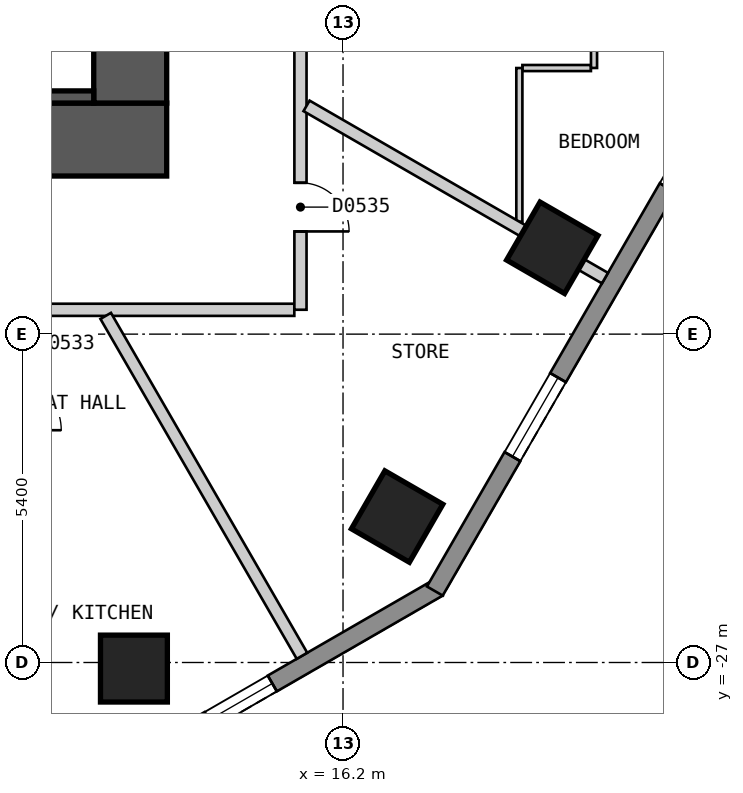
"""IFC4 building model, lengths in metres.
Left out: names, types, materials, properties, quantities, classifications, styles, units other than length and angle.
Written with IfcOpenShell. Run it as: python <this file> out.ifc"""

import sys

from ifc_helpers import new_model, si_unit, direction, frame, frame_2d, origin, origin_2d, place, context, subcontext, project, spatial, polyline, rectangle, outline, extrude, element, fill, save


model = new_model("IFC4")
c1 = context("Model", 3, precision=1e-05, world=origin(), true_north=direction((0.0, 1.0)))
c2 = subcontext(c1, "Body", "Model", "MODEL_VIEW")
j1 = project(units=[si_unit("LENGTHUNIT", "METRE"), si_unit("PLANEANGLEUNIT", "RADIAN")], contexts=[c1])
p1 = place(None, origin())
s1 = spatial("IfcSite", under=j1, at=p1, CompositionType="ELEMENT")
p2 = place(p1, origin())
s2 = spatial("IfcBuilding", under=s1, at=p2, CompositionType="ELEMENT")
p3 = place(p2, frame((0.0, 0.0, 56.4)))
s3 = spatial("IfcBuildingStorey", under=s2, at=p3, CompositionType="ELEMENT", Elevation=56.4)
for number, where, z_axis, x_axis in (
    (1, (12.761, -27.1, 0.0), (0.0, 0.0, 1.0), (1.0, 0.0, 0.0)),
    (2, (17.09, -24.6, 0.0), (0.0, 0.0, 1.0), (0.5, 0.866, 0.0)),
    (3, (19.642, -20.18, 0.0), (0.0, 0.0, 1.0), (0.5, 0.866, 0.0)),
):
    element("IfcColumn", number, at=place(p3, frame(where, z_axis=z_axis, x_axis=x_axis)), inside=s3, PredefinedType="COLUMN", context=c2, shape_type="SweptSolid", body=[
        extrude(rectangle(XDim=1.1, YDim=1.1, at=origin_2d()), origin(), (0.0, 0.0, 1.0), 3.0),
    ])
p4 = place(p3, frame((-13.3, -18.4, 0.0), z_axis=(0.0, 0.0, 1.0), x_axis=(1.0, 0.0, 0.0)))
e4 = element("IfcWall", 4, at=p4, inside=s3, PredefinedType="SHEAR", context=c2, shape_type="SweptSolid", body=[
    extrude(rectangle(XDim=26.6, YDim=1.2, at=frame_2d((13.3, 0.0))), origin(), (0.0, 0.0, 1.0), 2.7),
])
p5 = place(p3, frame((12.7, -17.8, 0.0), z_axis=(0.0, 0.0, 1.0), x_axis=(0.0, 1.0, 0.0)))
e5 = element("IfcWall", 5, at=p5, inside=s3, PredefinedType="SHEAR", context=c2, shape_type="SweptSolid", body=[
    extrude(rectangle(XDim=11.6, YDim=1.2, at=frame_2d((5.8, 0.0))), origin(), (0.0, 0.0, 1.0), 2.7),
])
p6 = place(p3, frame((13.435, -28.27, 0.0), z_axis=(0.0, 0.0, 1.0), x_axis=(0.866010750942, 0.50002537861, 0.0)))
e6 = element("IfcWall", 6, at=p6, inside=s3, PredefinedType="SOLIDWALL", context=c2, shape_type="SweptSolid", body=[
    extrude(outline(polyline([(0.0, -0.15), (5.0, -0.15), (4.919, 0.15), (0.08, 0.15), (0.0, -0.15)])), origin(), (0.0, 0.0, 1.0), 2.7),
])
p7 = place(p6, frame((0.65, 0.0, 0.15)))
e7 = element("IfcOpeningElement", 7, at=p7, cuts=e6, PredefinedType="OPENING", context=c2, shape_type="SweptSolid", body=[
    extrude(rectangle(XDim=1.2, YDim=2.1, at=frame_2d((0.6, 1.05))), frame((0.0, 0.16, 0.0), z_axis=(0.0, -1.0, 0.0), x_axis=(1.0, 0.0, 0.0)), (0.0, 0.0, 1.0), 0.32),
])
p8 = place(p3, frame((17.71, -25.825, 0.0), z_axis=(0.0, 0.0, 1.0), x_axis=(0.500001938803, 0.866024284413, 0.0)))
e8 = element("IfcWall", 8, at=p8, inside=s3, PredefinedType="SOLIDWALL", context=c2, shape_type="SweptSolid", body=[
    extrude(outline(polyline([(0.0, -0.15), (27.02, -0.15), (26.94, 0.15), (0.08, 0.15), (0.0, -0.15)])), origin(), (0.0, 0.0, 1.0), 2.7),
])
p9 = place(p8, frame((2.553, 0.0, 0.15)))
e9 = element("IfcOpeningElement", 9, at=p9, cuts=e8, PredefinedType="OPENING", context=c2, shape_type="SweptSolid", body=[
    extrude(rectangle(XDim=1.5, YDim=2.1, at=frame_2d((0.75, 1.05))), frame((0.0, 0.16, 0.0), z_axis=(0.0, -1.0, 0.0), x_axis=(1.0, 0.0, 0.0)), (0.0, 0.0, 1.0), 0.32),
])
p10 = place(p8, frame((7.658, 0.0, 0.15)))
e10 = element("IfcOpeningElement", 10, at=p10, cuts=e8, PredefinedType="OPENING", context=c2, shape_type="SweptSolid", body=[
    extrude(rectangle(XDim=1.5, YDim=2.1, at=frame_2d((0.75, 1.05))), frame((0.0, 0.16, 0.0), z_axis=(0.0, -1.0, 0.0), x_axis=(1.0, 0.0, 0.0)), (0.0, 0.0, 1.0), 0.32),
])
p11 = place(p8, frame((12.761, 0.0, 0.15)))
e11 = element("IfcOpeningElement", 11, at=p11, cuts=e8, PredefinedType="OPENING", context=c2, shape_type="SweptSolid", body=[
    extrude(rectangle(XDim=1.5, YDim=2.1, at=frame_2d((0.75, 1.05))), frame((0.0, 0.16, 0.0), z_axis=(0.0, -1.0, 0.0), x_axis=(1.0, 0.0, 0.0)), (0.0, 0.0, 1.0), 0.32),
])
p12 = place(p8, frame((17.865, 0.0, 0.15)))
e12 = element("IfcOpeningElement", 12, at=p12, cuts=e8, PredefinedType="OPENING", context=c2, shape_type="SweptSolid", body=[
    extrude(rectangle(XDim=1.5, YDim=2.1, at=frame_2d((0.75, 1.05))), frame((0.0, 0.16, 0.0), z_axis=(0.0, -1.0, 0.0), x_axis=(1.0, 0.0, 0.0)), (0.0, 0.0, 1.0), 0.32),
])
p13 = place(p8, frame((22.969, 0.0, 0.15)))
e13 = element("IfcOpeningElement", 13, at=p13, cuts=e8, PredefinedType="OPENING", context=c2, shape_type="SweptSolid", body=[
    extrude(rectangle(XDim=1.5, YDim=2.1, at=frame_2d((0.75, 1.05))), frame((0.0, 0.16, 0.0), z_axis=(0.0, -1.0, 0.0), x_axis=(1.0, 0.0, 0.0)), (0.0, 0.0, 1.0), 0.32),
])
p14 = place(p3, frame((-15.4, -21.2, 0.0), z_axis=(0.0, 0.0, 1.0), x_axis=(1.0, 0.0, 0.0)))
e14 = element("IfcWall", 14, at=p14, inside=s3, PredefinedType="PARTITIONING", context=c2, shape_type="SweptSolid", body=[
    extrude(rectangle(XDim=30.799, YDim=0.2, at=frame_2d((15.399, 0.0))), origin(), (0.0, 0.0, 1.0), 2.7),
])
p15 = place(p14, frame((4.985, 0.0, 0.0)))
e15 = element("IfcOpeningElement", 15, at=p15, cuts=e14, PredefinedType="OPENING", context=c2, shape_type="SweptSolid", body=[
    extrude(rectangle(XDim=0.9, YDim=2.1, at=frame_2d((0.45, 1.05))), frame((0.0, 0.11, 0.0), z_axis=(0.0, -1.0, 0.0), x_axis=(1.0, 0.0, 0.0)), (0.0, 0.0, 1.0), 0.22),
])
p16 = place(p14, frame((20.005, 0.0, 0.0)))
e16 = element("IfcOpeningElement", 16, at=p16, cuts=e14, PredefinedType="OPENING", context=c2, shape_type="SweptSolid", body=[
    extrude(rectangle(XDim=1.0, YDim=2.1, at=frame_2d((0.5, 1.05))), frame((0.0, 0.11, 0.0), z_axis=(0.0, -1.0, 0.0), x_axis=(1.0, 0.0, 0.0)), (0.0, 0.0, 1.0), 0.22),
])
p17 = place(p14, frame((24.916, 0.0, 0.0)))
e17 = element("IfcOpeningElement", 17, at=p17, cuts=e14, PredefinedType="OPENING", context=c2, shape_type="SweptSolid", body=[
    extrude(rectangle(XDim=0.9, YDim=2.1, at=frame_2d((0.45, 1.05))), frame((0.0, 0.11, 0.0), z_axis=(0.0, -1.0, 0.0), x_axis=(1.0, 0.0, 0.0)), (0.0, 0.0, 1.0), 0.22),
])
p18 = place(p3, frame((15.5, -21.199, 0.0), z_axis=(0.0, 0.0, 1.0), x_axis=(0.0, 1.0, 0.0)))
e18 = element("IfcWall", 18, at=p18, inside=s3, PredefinedType="PARTITIONING", context=c2, shape_type="SweptSolid", body=[
    extrude(rectangle(XDim=7.575, YDim=0.2, at=frame_2d((3.788, 0.0))), origin(), (0.0, 0.0, 1.0), 2.7),
])
p19 = place(p18, frame((1.288, 0.0, 0.0)))
e19 = element("IfcOpeningElement", 19, at=p19, cuts=e18, PredefinedType="OPENING", context=c2, shape_type="SweptSolid", body=[
    extrude(rectangle(XDim=0.8, YDim=2.1, at=frame_2d((0.4, 1.05))), frame((0.0, 0.11, 0.0), z_axis=(0.0, -1.0, 0.0), x_axis=(1.0, 0.0, 0.0)), (0.0, 0.0, 1.0), 0.22),
])
p20 = place(p3, frame((19.15, -17.224, 0.0), z_axis=(0.0, 0.0, 1.0), x_axis=(1.0, 0.0, 0.0)))
e20 = element("IfcWall", 20, at=p20, inside=s3, PredefinedType="PARTITIONING", context=c2, shape_type="SweptSolid", body=[
    extrude(rectangle(XDim=1.127, YDim=0.1, at=frame_2d((0.563, 0.0))), origin(), (0.0, 0.0, 1.0), 2.7),
])
p21 = place(p3, frame((19.1, -19.751, 0.0), z_axis=(0.0, 0.0, 1.0), x_axis=(0.0, 1.0, 0.0)))
e21 = element("IfcWall", 21, at=p21, inside=s3, PredefinedType="PARTITIONING", context=c2, shape_type="SweptSolid", body=[
    extrude(rectangle(XDim=2.527, YDim=0.1, at=frame_2d((1.263, 0.0))), origin(), (0.0, 0.0, 1.0), 2.7),
])
p22 = place(p3, frame((20.328, -17.223, 0.0), z_axis=(0.0, 0.0, 1.0), x_axis=(0.0, 1.0, 0.0)))
e22 = element("IfcWall", 22, at=p22, inside=s3, PredefinedType="PARTITIONING", context=c2, shape_type="SweptSolid", body=[
    extrude(rectangle(XDim=8.376, YDim=0.1, at=frame_2d((4.188, 0.0))), origin(), (0.0, 0.0, 1.0), 2.7),
])
p23 = place(p22, frame((0.37, 0.0, 0.0)))
e23 = element("IfcOpeningElement", 23, at=p23, cuts=e22, PredefinedType="OPENING", context=c2, shape_type="SweptSolid", body=[
    extrude(rectangle(XDim=0.8, YDim=2.1, at=frame_2d((0.4, 1.05))), frame((0.0, 0.06, 0.0), z_axis=(0.0, -1.0, 0.0), x_axis=(1.0, 0.0, 0.0)), (0.0, 0.0, 1.0), 0.12),
])
p24 = place(p3, frame((12.297, -21.3, 0.0), z_axis=(0.0, 0.0, 1.0), x_axis=(0.500056399578, -0.865992839024, 0.0)))
e24 = element("IfcWall", 24, at=p24, inside=s3, PredefinedType="PARTITIONING", context=c2, shape_type="SweptSolid", body=[
    extrude(rectangle(XDim=6.455, YDim=0.2, at=frame_2d((3.228, 0.0))), origin(), (0.0, 0.0, 1.0), 2.7),
])
p25 = place(p3, frame((15.6, -17.846, 0.0), z_axis=(0.0, 0.0, 1.0), x_axis=(0.866071523686, -0.499920109479, 0.0)))
e25 = element("IfcWall", 25, at=p25, inside=s3, PredefinedType="PARTITIONING", context=c2, shape_type="SweptSolid", body=[
    extrude(rectangle(XDim=5.667, YDim=0.2, at=frame_2d((2.833, 0.0))), origin(), (0.0, 0.0, 1.0), 2.7),
])
p26 = place(p3, frame((6.7, -17.7, 0.0), z_axis=(0.0, 0.0, 1.0), x_axis=(1.0, 0.0, 0.0)))
e26 = element("IfcWall", 26, at=p26, inside=s3, PredefinedType="SOLIDWALL", context=c2, shape_type="SweptSolid", body=[
    extrude(rectangle(XDim=5.4, YDim=0.2, at=frame_2d((2.7, 0.0))), origin(), (0.0, 0.0, 1.0), 2.7),
])
p27 = place(p7, origin())
e27 = element("IfcWindow", 27, at=p27, inside=s3, PartitioningType="SINGLE_PANEL", PredefinedType="WINDOW", context=c2, shape_type="SweptSolid", body=[
    extrude(rectangle(XDim=1.2, YDim=2.1, at=frame_2d((0.6, 1.05))), frame((0.0, 0.03, 0.0), z_axis=(0.0, -1.0, 0.0), x_axis=(1.0, 0.0, 0.0)), (0.0, 0.0, 1.0), 0.06),
])
fill(e7, e27)
p28 = place(p9, origin())
e28 = element("IfcWindow", 28, at=p28, inside=s3, PartitioningType="SINGLE_PANEL", PredefinedType="WINDOW", context=c2, shape_type="SweptSolid", body=[
    extrude(rectangle(XDim=1.5, YDim=2.1, at=frame_2d((0.75, 1.05))), frame((0.0, 0.03, 0.0), z_axis=(0.0, -1.0, 0.0), x_axis=(1.0, 0.0, 0.0)), (0.0, 0.0, 1.0), 0.06),
])
fill(e9, e28)
p29 = place(p19, origin())
e29 = element("IfcDoor", 29, at=p29, inside=s3, OperationType="SINGLE_SWING_LEFT", PredefinedType="DOOR", context=c2, shape_type="SweptSolid", body=[
    extrude(rectangle(XDim=0.8, YDim=2.1, at=frame_2d((0.4, 1.05))), frame((0.0, 0.025, 0.0), z_axis=(0.0, -1.0, 0.0), x_axis=(1.0, 0.0, 0.0)), (0.0, 0.0, 1.0), 0.05),
])
fill(e19, e29)
save(model, sys.argv[1])
